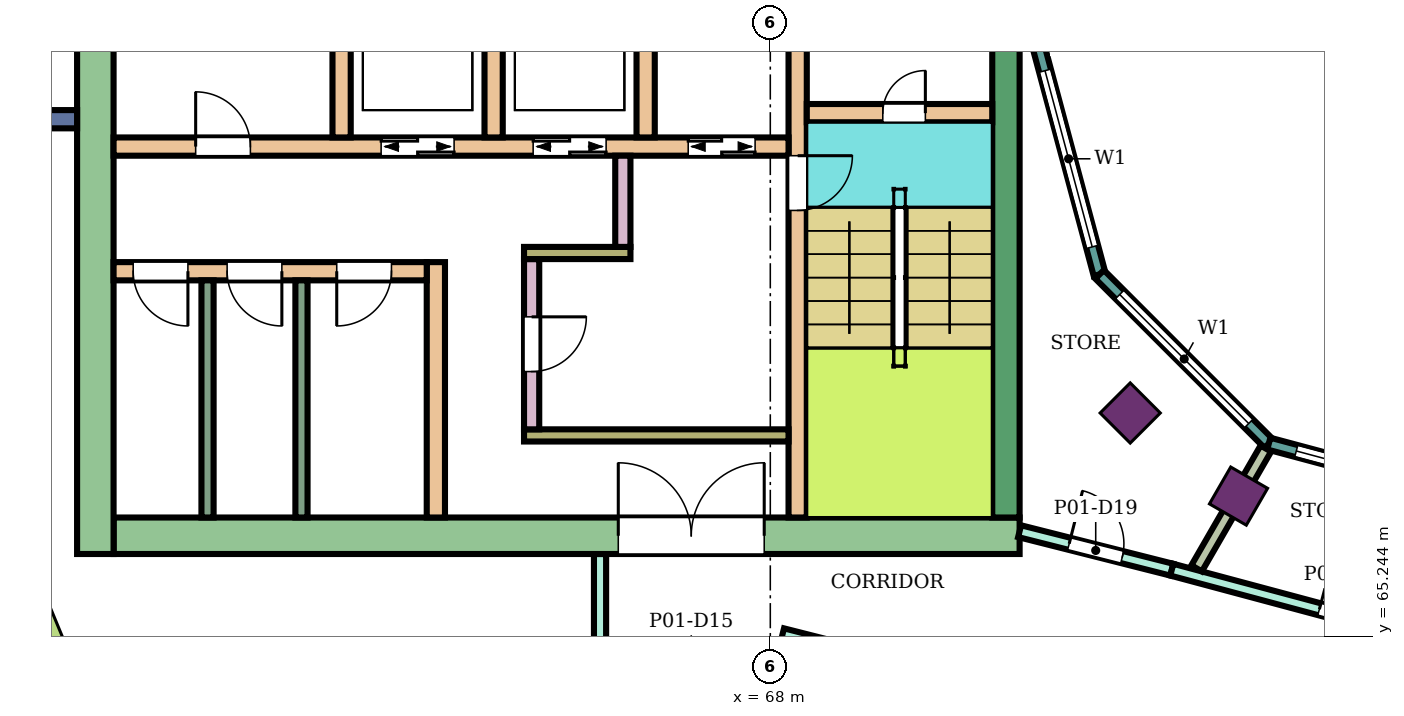
"""IFC4 building model, lengths in metres.
Left out: names, types, materials, properties, quantities, classifications, styles, units other than length and angle.
Written with IfcOpenShell. Run it as: python <this file> out.ifc"""

import sys

from ifc_helpers import new_model, si_unit, direction, frame, frame_2d, origin, origin_2d, place, context, subcontext, project, spatial, rectangle, extrude, element, fill, save


model = new_model("IFC4")
c1 = context("Model", 3, precision=1e-05, world=origin(), true_north=direction((0.0, 1.0)))
c2 = subcontext(c1, "Body", "Model", "MODEL_VIEW")
j1 = project(units=[si_unit("LENGTHUNIT", "METRE"), si_unit("PLANEANGLEUNIT", "RADIAN")], contexts=[c1])
p1 = place(None, origin())
s1 = spatial("IfcSite", under=j1, at=p1, CompositionType="ELEMENT")
p2 = place(p1, origin())
s2 = spatial("IfcBuilding", under=s1, at=p2, CompositionType="ELEMENT")
p3 = place(p2, frame((0.0, 0.0, 270.9)))
s3 = spatial("IfcBuildingStorey", under=s2, at=p3, CompositionType="ELEMENT", Elevation=270.9)
for number, where, z_axis, x_axis in (
    (1, (73.919, 68.919, 0.0), (0.0, 0.0, 1.0), (-0.707, -0.707, 0.0)),
    (2, (75.7, 67.552, 0.0), (0.0, 0.0, 1.0), (-0.5, -0.866, 0.0)),
):
    element("IfcColumn", number, at=place(p3, frame(where, z_axis=z_axis, x_axis=x_axis)), inside=s3, PredefinedType="COLUMN", context=c2, shape_type="SweptSolid", body=[
        extrude(rectangle(XDim=0.7, YDim=0.7, at=origin_2d()), origin(), (0.0, 0.0, 1.0), 4.8),
    ])
p4 = place(p3, frame((72.1, 66.9, 0.0), z_axis=(0.0, 0.0, 1.0), x_axis=(-1.0, 0.0, 0.0)))
e3 = element("IfcWall", 3, at=p4, inside=s3, PredefinedType="SHEAR", context=c2, shape_type="SweptSolid", body=[
    extrude(rectangle(XDim=14.9, YDim=0.6, at=frame_2d((7.45, 0.0))), origin(), (0.0, 0.0, 1.0), 4.48),
])
p5 = place(p4, frame((4.2, 0.0, 0.0)))
e4 = element("IfcOpeningElement", 4, at=p5, cuts=e3, PredefinedType="OPENING", context=c2, shape_type="SweptSolid", body=[
    extrude(rectangle(XDim=2.4, YDim=2.4, at=frame_2d((1.2, 1.2))), frame((0.0, 0.31, 0.0), z_axis=(0.0, -1.0, 0.0), x_axis=(1.0, 0.0, 0.0)), (0.0, 0.0, 1.0), 0.62),
])
p6 = place(p3, frame((71.875, 75.0, 0.0), z_axis=(0.0, 0.0, 1.0), x_axis=(0.0, -1.0, 0.0)))
e5 = element("IfcWall", 5, at=p6, inside=s3, PredefinedType="SHEAR", context=c2, shape_type="SweptSolid", body=[
    extrude(rectangle(XDim=7.8, YDim=0.45, at=frame_2d((3.9, 0.0))), origin(), (0.0, 0.0, 1.0), 4.48),
])
p7 = place(p3, frame((56.9, 83.4, 0.0), z_axis=(0.0, 0.0, 1.0), x_axis=(0.0, -1.0, 0.0)))
e6 = element("IfcWall", 6, at=p7, inside=s3, PredefinedType="SHEAR", context=c2, shape_type="SweptSolid", body=[
    extrude(rectangle(XDim=16.8, YDim=0.6, at=frame_2d((8.4, 0.0))), origin(), (0.0, 0.0, 1.0), 4.48),
])
p8 = place(p3, frame((68.45, 75.0, 0.0), z_axis=(0.0, 0.0, 1.0), x_axis=(0.0, -1.0, 0.0)))
e7 = element("IfcWall", 7, at=p8, inside=s3, PredefinedType="SHEAR", context=c2, shape_type="SweptSolid", body=[
    extrude(rectangle(XDim=7.8, YDim=0.3, at=frame_2d((3.9, 0.0))), origin(), (0.0, 0.0, 1.0), 4.48),
])
p9 = place(p8, frame((1.85, 0.0, 0.0)))
e8 = element("IfcOpeningElement", 8, at=p9, cuts=e7, PredefinedType="OPENING", context=c2, shape_type="SweptSolid", body=[
    extrude(rectangle(XDim=0.9, YDim=2.1, at=frame_2d((0.45, 1.05))), frame((0.0, 0.16, 0.0), z_axis=(0.0, -1.0, 0.0), x_axis=(1.0, 0.0, 0.0)), (0.0, 0.0, 1.0), 0.32),
])
p10 = place(p3, frame((71.65, 73.85, 0.0), z_axis=(0.0, 0.0, 1.0), x_axis=(-1.0, 0.0, 0.0)))
e9 = element("IfcWall", 9, at=p10, inside=s3, PredefinedType="SHEAR", context=c2, shape_type="SweptSolid", body=[
    extrude(rectangle(XDim=3.05, YDim=0.3, at=frame_2d((1.525, 0.0))), origin(), (0.0, 0.0, 1.0), 4.48),
])
p11 = place(p10, frame((1.1, 0.0, 0.0)))
e10 = element("IfcOpeningElement", 10, at=p11, cuts=e9, PredefinedType="OPENING", context=c2, shape_type="SweptSolid", body=[
    extrude(rectangle(XDim=0.7, YDim=2.0, at=frame_2d((0.35, 1.0))), frame((0.0, 0.16, 0.0), z_axis=(0.0, -1.0, 0.0), x_axis=(1.0, 0.0, 0.0)), (0.0, 0.0, 1.0), 0.32),
])
p12 = place(p3, frame((68.3, 73.3, 0.0), z_axis=(0.0, 0.0, 1.0), x_axis=(-1.0, 0.0, 0.0)))
e11 = element("IfcWall", 11, at=p12, inside=s3, PredefinedType="SHEAR", context=c2, shape_type="SweptSolid", body=[
    extrude(rectangle(XDim=11.1, YDim=0.3, at=frame_2d((5.55, 0.0))), origin(), (0.0, 0.0, 1.0), 4.48),
])
p13 = place(p12, frame((0.55, 0.0, 0.0)))
e12 = element("IfcOpeningElement", 12, at=p13, cuts=e11, PredefinedType="OPENING", context=c2, shape_type="SweptSolid", body=[
    extrude(rectangle(XDim=1.1, YDim=2.1, at=frame_2d((0.55, 1.05))), frame((0.0, 0.16, 0.0), z_axis=(0.0, -1.0, 0.0), x_axis=(1.0, 0.0, 0.0)), (0.0, 0.0, 1.0), 0.32),
])
p14 = place(p12, frame((3.0, 0.0, 0.0)))
e13 = element("IfcOpeningElement", 13, at=p14, cuts=e11, PredefinedType="OPENING", context=c2, shape_type="SweptSolid", body=[
    extrude(rectangle(XDim=1.2, YDim=2.1, at=frame_2d((0.6, 1.05))), frame((0.0, 0.16, 0.0), z_axis=(0.0, -1.0, 0.0), x_axis=(1.0, 0.0, 0.0)), (0.0, 0.0, 1.0), 0.32),
])
p15 = place(p12, frame((5.5, 0.0, 0.0)))
e14 = element("IfcOpeningElement", 14, at=p15, cuts=e11, PredefinedType="OPENING", context=c2, shape_type="SweptSolid", body=[
    extrude(rectangle(XDim=1.2, YDim=2.1, at=frame_2d((0.6, 1.05))), frame((0.0, 0.16, 0.0), z_axis=(0.0, -1.0, 0.0), x_axis=(1.0, 0.0, 0.0)), (0.0, 0.0, 1.0), 0.32),
])
p16 = place(p12, frame((8.85, 0.0, 0.0)))
e15 = element("IfcOpeningElement", 15, at=p16, cuts=e11, PredefinedType="OPENING", context=c2, shape_type="SweptSolid", body=[
    extrude(rectangle(XDim=0.9, YDim=2.1, at=frame_2d((0.45, 1.05))), frame((0.0, 0.16, 0.0), z_axis=(0.0, -1.0, 0.0), x_axis=(1.0, 0.0, 0.0)), (0.0, 0.0, 1.0), 0.32),
])
for number, where, z_axis, x_axis in (
    (16, (65.95, 76.0, 0.0), (0.0, 0.0, 1.0), (0.0, -1.0, 0.0)),
    (17, (63.45, 76.0, 0.0), (0.0, 0.0, 1.0), (0.0, -1.0, 0.0)),
    (18, (60.95, 76.0, 0.0), (0.0, 0.0, 1.0), (0.0, -1.0, 0.0)),
):
    element("IfcWall", number, at=place(p3, frame(where, z_axis=z_axis, x_axis=x_axis)), inside=s3, PredefinedType="SHEAR", context=c2, shape_type="SweptSolid", body=[
        extrude(rectangle(XDim=2.55, YDim=0.3, at=frame_2d((1.275, 0.0))), origin(), (0.0, 0.0, 1.0), 4.48),
    ])
p17 = place(p3, frame((68.3, 68.55, 0.0), z_axis=(0.0, 0.0, 1.0), x_axis=(-1.0, 0.0, 0.0)))
e19 = element("IfcWall", 19, at=p17, inside=s3, PredefinedType="SHEAR", context=c2, shape_type="SweptSolid", body=[
    extrude(rectangle(XDim=4.35, YDim=0.2, at=frame_2d((2.175, 0.0))), origin(), (0.0, 0.0, 1.0), 4.48),
])
p18 = place(p3, frame((64.075, 71.45, 0.0), z_axis=(0.0, 0.0, 1.0), x_axis=(0.0, -1.0, 0.0)))
e20 = element("IfcWall", 20, at=p18, inside=s3, PredefinedType="SHEAR", context=c2, shape_type="SweptSolid", body=[
    extrude(rectangle(XDim=2.8, YDim=0.25, at=frame_2d((1.4, 0.0))), origin(), (0.0, 0.0, 1.0), 4.48),
])
p19 = place(p18, frame((0.95, 0.0, 0.0)))
e21 = element("IfcOpeningElement", 21, at=p19, cuts=e20, PredefinedType="OPENING", context=c2, shape_type="SweptSolid", body=[
    extrude(rectangle(XDim=0.9, YDim=2.1, at=frame_2d((0.45, 1.05))), frame((0.0, 0.135, 0.0), z_axis=(0.0, -1.0, 0.0), x_axis=(1.0, 0.0, 0.0)), (0.0, 0.0, 1.0), 0.27),
])
p20 = place(p3, frame((65.7, 71.55, 0.0), z_axis=(0.0, 0.0, 1.0), x_axis=(-1.0, 0.0, 0.0)))
e22 = element("IfcWall", 22, at=p20, inside=s3, PredefinedType="SHEAR", context=c2, shape_type="SweptSolid", body=[
    extrude(rectangle(XDim=1.75, YDim=0.2, at=frame_2d((0.875, 0.0))), origin(), (0.0, 0.0, 1.0), 4.48),
])
p21 = place(p3, frame((65.575, 73.15, 0.0), z_axis=(0.0, 0.0, 1.0), x_axis=(0.0, -1.0, 0.0)))
e23 = element("IfcWall", 23, at=p21, inside=s3, PredefinedType="SHEAR", context=c2, shape_type="SweptSolid", body=[
    extrude(rectangle(XDim=1.5, YDim=0.25, at=frame_2d((0.75, 0.0))), origin(), (0.0, 0.0, 1.0), 4.48),
])
p22 = place(p3, frame((62.5, 71.4, 0.0), z_axis=(0.0, 0.0, 1.0), x_axis=(0.0, -1.0, 0.0)))
e24 = element("IfcWall", 24, at=p22, inside=s3, PredefinedType="SHEAR", context=c2, shape_type="SweptSolid", body=[
    extrude(rectangle(XDim=4.2, YDim=0.3, at=frame_2d((2.1, 0.0))), origin(), (0.0, 0.0, 1.0), 4.48),
])
p23 = place(p3, frame((62.35, 71.25, 0.0), z_axis=(0.0, 0.0, 1.0), x_axis=(-1.0, 0.0, 0.0)))
e25 = element("IfcWall", 25, at=p23, inside=s3, PredefinedType="SHEAR", context=c2, shape_type="SweptSolid", body=[
    extrude(rectangle(XDim=5.15, YDim=0.3, at=frame_2d((2.575, 0.0))), origin(), (0.0, 0.0, 1.0), 4.48),
])
p24 = place(p23, frame((0.58, 0.0, 0.0)))
e26 = element("IfcOpeningElement", 26, at=p24, cuts=e25, PredefinedType="OPENING", context=c2, shape_type="SweptSolid", body=[
    extrude(rectangle(XDim=0.9, YDim=2.1, at=frame_2d((0.45, 1.05))), frame((0.0, 0.16, 0.0), z_axis=(0.0, -1.0, 0.0), x_axis=(1.0, 0.0, 0.0)), (0.0, 0.0, 1.0), 0.32),
])
p25 = place(p23, frame((2.383, 0.0, 0.0)))
e27 = element("IfcOpeningElement", 27, at=p25, cuts=e25, PredefinedType="OPENING", context=c2, shape_type="SweptSolid", body=[
    extrude(rectangle(XDim=0.9, YDim=2.1, at=frame_2d((0.45, 1.05))), frame((0.0, 0.16, 0.0), z_axis=(0.0, -1.0, 0.0), x_axis=(1.0, 0.0, 0.0)), (0.0, 0.0, 1.0), 0.32),
])
p26 = place(p23, frame((3.927, 0.0, 0.0)))
e28 = element("IfcOpeningElement", 28, at=p26, cuts=e25, PredefinedType="OPENING", context=c2, shape_type="SweptSolid", body=[
    extrude(rectangle(XDim=0.9, YDim=2.1, at=frame_2d((0.45, 1.05))), frame((0.0, 0.16, 0.0), z_axis=(0.0, -1.0, 0.0), x_axis=(1.0, 0.0, 0.0)), (0.0, 0.0, 1.0), 0.32),
])
p27 = place(p3, frame((56.6, 73.75, 0.0), z_axis=(0.0, 0.0, 1.0), x_axis=(-1.0, 0.0, 0.0)))
e29 = element("IfcWall", 29, at=p27, inside=s3, PredefinedType="NOTDEFINED", context=c2, shape_type="SweptSolid", body=[
    extrude(rectangle(XDim=2.416, YDim=0.3, at=frame_2d((1.208, 0.0))), origin(), (0.0, 0.0, 1.0), 4.8),
])
p28 = place(p3, frame((72.396, 75.0, 0.0), z_axis=(0.0, 0.0, 1.0), x_axis=(0.258789828301, -0.965933654434, 0.0)))
e30 = element("IfcWall", 30, at=p28, inside=s3, PredefinedType="NOTDEFINED", context=c2, shape_type="SweptSolid", body=[
    extrude(rectangle(XDim=3.936, YDim=0.2, at=frame_2d((1.968, 0.0))), origin(), (0.0, 0.0, 1.0), 4.8),
])
p29 = place(p28, frame((0.468, 0.0, 0.9)))
e31 = element("IfcOpeningElement", 31, at=p29, cuts=e30, PredefinedType="OPENING", context=c2, shape_type="SweptSolid", body=[
    extrude(rectangle(XDim=3.0, YDim=2.3, at=frame_2d((1.5, 1.15))), frame((0.0, 0.11, 0.0), z_axis=(0.0, -1.0, 0.0), x_axis=(1.0, 0.0, 0.0)), (0.0, 0.0, 1.0), 0.22),
])
p30 = place(p3, frame((73.415, 71.198, 0.0), z_axis=(0.0, 0.0, 1.0), x_axis=(0.707106781187, -0.707106781187, 0.0)))
e32 = element("IfcWall", 32, at=p30, inside=s3, PredefinedType="NOTDEFINED", context=c2, shape_type="SweptSolid", body=[
    extrude(rectangle(XDim=3.936, YDim=0.2, at=frame_2d((1.968, 0.0))), origin(), (0.0, 0.0, 1.0), 4.8),
])
p31 = place(p30, frame((0.468, 0.0, 0.9)))
e33 = element("IfcOpeningElement", 33, at=p31, cuts=e32, PredefinedType="OPENING", context=c2, shape_type="SweptSolid", body=[
    extrude(rectangle(XDim=3.0, YDim=2.3, at=frame_2d((1.5, 1.15))), frame((0.0, 0.11, 0.0), z_axis=(0.0, -1.0, 0.0), x_axis=(1.0, 0.0, 0.0)), (0.0, 0.0, 1.0), 0.22),
])
p32 = place(p3, frame((76.198, 68.415, 0.0), z_axis=(0.0, 0.0, 1.0), x_axis=(0.965933654434, -0.258789828301, 0.0)))
e34 = element("IfcWall", 34, at=p32, inside=s3, PredefinedType="NOTDEFINED", context=c2, shape_type="SweptSolid", body=[
    extrude(rectangle(XDim=3.936, YDim=0.2, at=frame_2d((1.968, 0.0))), origin(), (0.0, 0.0, 1.0), 4.8),
])
p33 = place(p32, frame((0.468, 0.0, 0.9)))
e35 = element("IfcOpeningElement", 35, at=p33, cuts=e34, PredefinedType="OPENING", context=c2, shape_type="SweptSolid", body=[
    extrude(rectangle(XDim=3.0, YDim=2.3, at=frame_2d((1.5, 1.15))), frame((0.0, 0.11, 0.0), z_axis=(0.0, -1.0, 0.0), x_axis=(1.0, 0.0, 0.0)), (0.0, 0.0, 1.0), 0.22),
])
p34 = place(p3, frame((65.2, 65.2, 0.0), z_axis=(0.0, 0.0, 1.0), x_axis=(0.0, 1.0, 0.0)))
e36 = element("IfcWall", 36, at=p34, inside=s3, PredefinedType="PARTITIONING", context=c2, shape_type="SweptSolid", body=[
    extrude(rectangle(XDim=1.399, YDim=0.2, at=frame_2d((0.7, 0.0))), origin(), (0.0, 0.0, 1.0), 4.35),
])
p35 = place(p3, frame((68.201, 65.28, 0.0), z_axis=(0.0, 0.0, 1.0), x_axis=(0.969376914413, -0.245577681811, 0.0)))
e37 = element("IfcWall", 37, at=p35, inside=s3, PredefinedType="PARTITIONING", context=c2, shape_type="SweptSolid", body=[
    extrude(rectangle(XDim=5.927, YDim=0.2, at=frame_2d((2.963, 0.0))), origin(), (0.0, 0.0, 1.0), 4.35),
])
p36 = place(p35, frame((3.188, 0.0, 0.0)))
e38 = element("IfcOpeningElement", 38, at=p36, cuts=e37, PredefinedType="OPENING", context=c2, shape_type="SweptSolid", body=[
    extrude(rectangle(XDim=0.9, YDim=2.1, at=frame_2d((0.45, 1.05))), frame((0.0, 0.11, 0.0), z_axis=(0.0, -1.0, 0.0), x_axis=(1.0, 0.0, 0.0)), (0.0, 0.0, 1.0), 0.22),
])
p37 = place(p3, frame((72.1, 66.975, 0.0), z_axis=(0.0, 0.0, 1.0), x_axis=(0.969471314457, -0.245204752086, 0.0)))
e39 = element("IfcWall", 39, at=p37, inside=s3, PredefinedType="PARTITIONING", context=c2, shape_type="SweptSolid", body=[
    extrude(rectangle(XDim=2.582, YDim=0.2, at=frame_2d((1.291, 0.0))), origin(), (0.0, 0.0, 1.0), 4.35),
])
p38 = place(p37, frame((0.841, 0.0, 0.0)))
e40 = element("IfcOpeningElement", 40, at=p38, cuts=e39, PredefinedType="OPENING", context=c2, shape_type="SweptSolid", body=[
    extrude(rectangle(XDim=0.9, YDim=2.1, at=frame_2d((0.45, 1.05))), frame((0.0, 0.11, 0.0), z_axis=(0.0, -1.0, 0.0), x_axis=(1.0, 0.0, 0.0)), (0.0, 0.0, 1.0), 0.22),
])
p39 = place(p3, frame((74.603, 66.342, 0.0), z_axis=(0.0, 0.0, 1.0), x_axis=(0.965920893652, -0.258837453254, 0.0)))
e41 = element("IfcWall", 41, at=p39, inside=s3, PredefinedType="PARTITIONING", context=c2, shape_type="SweptSolid", body=[
    extrude(rectangle(XDim=5.458, YDim=0.2, at=frame_2d((2.729, 0.0))), origin(), (0.0, 0.0, 1.0), 4.35),
])
p40 = place(p39, frame((2.512, 0.0, 0.0)))
e42 = element("IfcOpeningElement", 42, at=p40, cuts=e41, PredefinedType="OPENING", context=c2, shape_type="SweptSolid", body=[
    extrude(rectangle(XDim=0.9, YDim=2.1, at=frame_2d((0.45, 1.05))), frame((0.0, 0.11, 0.0), z_axis=(0.0, -1.0, 0.0), x_axis=(1.0, 0.0, 0.0)), (0.0, 0.0, 1.0), 0.22),
])
p41 = place(p3, frame((75.011, 66.364, 0.0), z_axis=(0.0, 0.0, 1.0), x_axis=(0.500097042406, 0.865969369075, 0.0)))
e43 = element("IfcWall", 43, at=p41, inside=s3, PredefinedType="PARTITIONING", context=c2, shape_type="SweptSolid", body=[
    extrude(rectangle(XDim=2.275, YDim=0.2, at=frame_2d((1.138, 0.0))), origin(), (0.0, 0.0, 1.0), 3.08),
])
for number, where, z_axis, x_axis in (
    (44, (60.29, 71.1, 0.0), (0.0, 0.0, 1.0), (0.0, -1.0, 0.0)),
    (45, (58.745, 71.1, 0.0), (0.0, 0.0, 1.0), (0.0, -1.0, 0.0)),
):
    element("IfcWall", number, at=place(p3, frame(where, z_axis=z_axis, x_axis=x_axis)), inside=s3, PredefinedType="PARTITIONING", context=c2, shape_type="SweptSolid", body=[
        extrude(rectangle(XDim=3.9, YDim=0.2, at=frame_2d((1.95, 0.0))), origin(), (0.0, 0.0, 1.0), 4.48),
    ])
p42 = place(p29, origin())
e46 = element("IfcWindow", 46, at=p42, inside=s3, PartitioningType="SINGLE_PANEL", PredefinedType="WINDOW", context=c2, shape_type="SweptSolid", body=[
    extrude(rectangle(XDim=3.0, YDim=2.3, at=frame_2d((1.5, 1.15))), frame((0.0, 0.03, 0.0), z_axis=(0.0, -1.0, 0.0), x_axis=(1.0, 0.0, 0.0)), (0.0, 0.0, 1.0), 0.06),
])
fill(e31, e46)
p43 = place(p31, origin())
e47 = element("IfcWindow", 47, at=p43, inside=s3, PartitioningType="SINGLE_PANEL", PredefinedType="WINDOW", context=c2, shape_type="SweptSolid", body=[
    extrude(rectangle(XDim=3.0, YDim=2.3, at=frame_2d((1.5, 1.15))), frame((0.0, 0.03, 0.0), z_axis=(0.0, -1.0, 0.0), x_axis=(1.0, 0.0, 0.0)), (0.0, 0.0, 1.0), 0.06),
])
fill(e33, e47)
p44 = place(p33, origin())
e48 = element("IfcWindow", 48, at=p44, inside=s3, PartitioningType="SINGLE_PANEL", PredefinedType="WINDOW", context=c2, shape_type="SweptSolid", body=[
    extrude(rectangle(XDim=3.0, YDim=2.3, at=frame_2d((1.5, 1.15))), frame((0.0, 0.03, 0.0), z_axis=(0.0, -1.0, 0.0), x_axis=(1.0, 0.0, 0.0)), (0.0, 0.0, 1.0), 0.06),
])
fill(e35, e48)
p45 = place(p40, origin())
e49 = element("IfcDoor", 49, at=p45, inside=s3, OperationType="SINGLE_SWING_LEFT", PredefinedType="DOOR", context=c2, shape_type="SweptSolid", body=[
    extrude(rectangle(XDim=0.9, YDim=2.1, at=frame_2d((0.45, 1.05))), frame((0.0, 0.025, 0.0), z_axis=(0.0, -1.0, 0.0), x_axis=(1.0, 0.0, 0.0)), (0.0, 0.0, 1.0), 0.05),
])
fill(e42, e49)
p46 = place(p38, origin())
e50 = element("IfcDoor", 50, at=p46, inside=s3, OperationType="SINGLE_SWING_LEFT", PredefinedType="DOOR", context=c2, shape_type="SweptSolid", body=[
    extrude(rectangle(XDim=0.9, YDim=2.1, at=frame_2d((0.45, 1.05))), frame((0.0, 0.025, 0.0), z_axis=(0.0, -1.0, 0.0), x_axis=(1.0, 0.0, 0.0)), (0.0, 0.0, 1.0), 0.05),
])
fill(e40, e50)
p47 = place(p11, frame((0.7, 0.0, 0.0), z_axis=(0.0, 0.0, 1.0), x_axis=(-1.0, 0.0, 0.0)))
e51 = element("IfcDoor", 51, at=p47, inside=s3, OperationType="SINGLE_SWING_RIGHT", PredefinedType="DOOR", context=c2, shape_type="SweptSolid", body=[
    extrude(rectangle(XDim=0.7, YDim=2.0, at=frame_2d((0.35, 1.0))), frame((0.0, 0.025, 0.0), z_axis=(0.0, -1.0, 0.0), x_axis=(1.0, 0.0, 0.0)), (0.0, 0.0, 1.0), 0.05),
])
fill(e10, e51)
p48 = place(p9, origin())
e52 = element("IfcDoor", 52, at=p48, inside=s3, OperationType="SINGLE_SWING_LEFT", PredefinedType="DOOR", context=c2, shape_type="SweptSolid", body=[
    extrude(rectangle(XDim=0.9, YDim=2.1, at=frame_2d((0.45, 1.05))), frame((0.0, 0.025, 0.0), z_axis=(0.0, -1.0, 0.0), x_axis=(1.0, 0.0, 0.0)), (0.0, 0.0, 1.0), 0.05),
])
fill(e8, e52)
p49 = place(p13, origin())
e53 = element("IfcDoor", 53, at=p49, inside=s3, OperationType="DOUBLE_DOOR_SLIDING", PredefinedType="DOOR", context=c2, shape_type="SweptSolid", body=[
    extrude(rectangle(XDim=1.1, YDim=2.1, at=frame_2d((0.55, 1.05))), frame((0.0, 0.025, 0.0), z_axis=(0.0, -1.0, 0.0), x_axis=(1.0, 0.0, 0.0)), (0.0, 0.0, 1.0), 0.05),
])
fill(e12, e53)
p50 = place(p14, origin())
e54 = element("IfcDoor", 54, at=p50, inside=s3, OperationType="DOUBLE_DOOR_SLIDING", PredefinedType="DOOR", context=c2, shape_type="SweptSolid", body=[
    extrude(rectangle(XDim=1.2, YDim=2.1, at=frame_2d((0.6, 1.05))), frame((0.0, 0.025, 0.0), z_axis=(0.0, -1.0, 0.0), x_axis=(1.0, 0.0, 0.0)), (0.0, 0.0, 1.0), 0.05),
])
fill(e13, e54)
p51 = place(p15, origin())
e55 = element("IfcDoor", 55, at=p51, inside=s3, OperationType="DOUBLE_DOOR_SLIDING", PredefinedType="DOOR", context=c2, shape_type="SweptSolid", body=[
    extrude(rectangle(XDim=1.2, YDim=2.1, at=frame_2d((0.6, 1.05))), frame((0.0, 0.025, 0.0), z_axis=(0.0, -1.0, 0.0), x_axis=(1.0, 0.0, 0.0)), (0.0, 0.0, 1.0), 0.05),
])
fill(e14, e55)
p52 = place(p16, frame((0.9, 0.0, 0.0), z_axis=(0.0, 0.0, 1.0), x_axis=(-1.0, 0.0, 0.0)))
e56 = element("IfcDoor", 56, at=p52, inside=s3, OperationType="SINGLE_SWING_LEFT", PredefinedType="DOOR", context=c2, shape_type="SweptSolid", body=[
    extrude(rectangle(XDim=0.9, YDim=2.1, at=frame_2d((0.45, 1.05))), frame((0.0, 0.025, 0.0), z_axis=(0.0, -1.0, 0.0), x_axis=(1.0, 0.0, 0.0)), (0.0, 0.0, 1.0), 0.05),
])
fill(e15, e56)
p53 = place(p19, origin())
e57 = element("IfcDoor", 57, at=p53, inside=s3, OperationType="SINGLE_SWING_LEFT", PredefinedType="DOOR", context=c2, shape_type="SweptSolid", body=[
    extrude(rectangle(XDim=0.9, YDim=2.1, at=frame_2d((0.45, 1.05))), frame((0.0, 0.025, 0.0), z_axis=(0.0, -1.0, 0.0), x_axis=(1.0, 0.0, 0.0)), (0.0, 0.0, 1.0), 0.05),
])
fill(e21, e57)
p54 = place(p24, origin())
e58 = element("IfcDoor", 58, at=p54, inside=s3, OperationType="SINGLE_SWING_RIGHT", PredefinedType="DOOR", context=c2, shape_type="SweptSolid", body=[
    extrude(rectangle(XDim=0.9, YDim=2.1, at=frame_2d((0.45, 1.05))), frame((0.0, 0.025, 0.0), z_axis=(0.0, -1.0, 0.0), x_axis=(1.0, 0.0, 0.0)), (0.0, 0.0, 1.0), 0.05),
])
fill(e26, e58)
p55 = place(p25, origin())
e59 = element("IfcDoor", 59, at=p55, inside=s3, OperationType="SINGLE_SWING_LEFT", PredefinedType="DOOR", context=c2, shape_type="SweptSolid", body=[
    extrude(rectangle(XDim=0.9, YDim=2.1, at=frame_2d((0.45, 1.05))), frame((0.0, 0.025, 0.0), z_axis=(0.0, -1.0, 0.0), x_axis=(1.0, 0.0, 0.0)), (0.0, 0.0, 1.0), 0.05),
])
fill(e27, e59)
p56 = place(p26, origin())
e60 = element("IfcDoor", 60, at=p56, inside=s3, OperationType="SINGLE_SWING_LEFT", PredefinedType="DOOR", context=c2, shape_type="SweptSolid", body=[
    extrude(rectangle(XDim=0.9, YDim=2.1, at=frame_2d((0.45, 1.05))), frame((0.0, 0.025, 0.0), z_axis=(0.0, -1.0, 0.0), x_axis=(1.0, 0.0, 0.0)), (0.0, 0.0, 1.0), 0.05),
])
fill(e28, e60)
p57 = place(p5, frame((2.4, 0.0, 0.0), z_axis=(0.0, 0.0, 1.0), x_axis=(-1.0, 0.0, 0.0)))
e61 = element("IfcDoor", 61, at=p57, inside=s3, OperationType="DOUBLE_DOOR_SINGLE_SWING", PredefinedType="DOOR", context=c2, shape_type="SweptSolid", body=[
    extrude(rectangle(XDim=2.4, YDim=2.4, at=frame_2d((1.2, 1.2))), frame((0.0, 0.025, 0.0), z_axis=(0.0, -1.0, 0.0), x_axis=(1.0, 0.0, 0.0)), (0.0, 0.0, 1.0), 0.05),
])
fill(e4, e61)
save(model, sys.argv[1])
